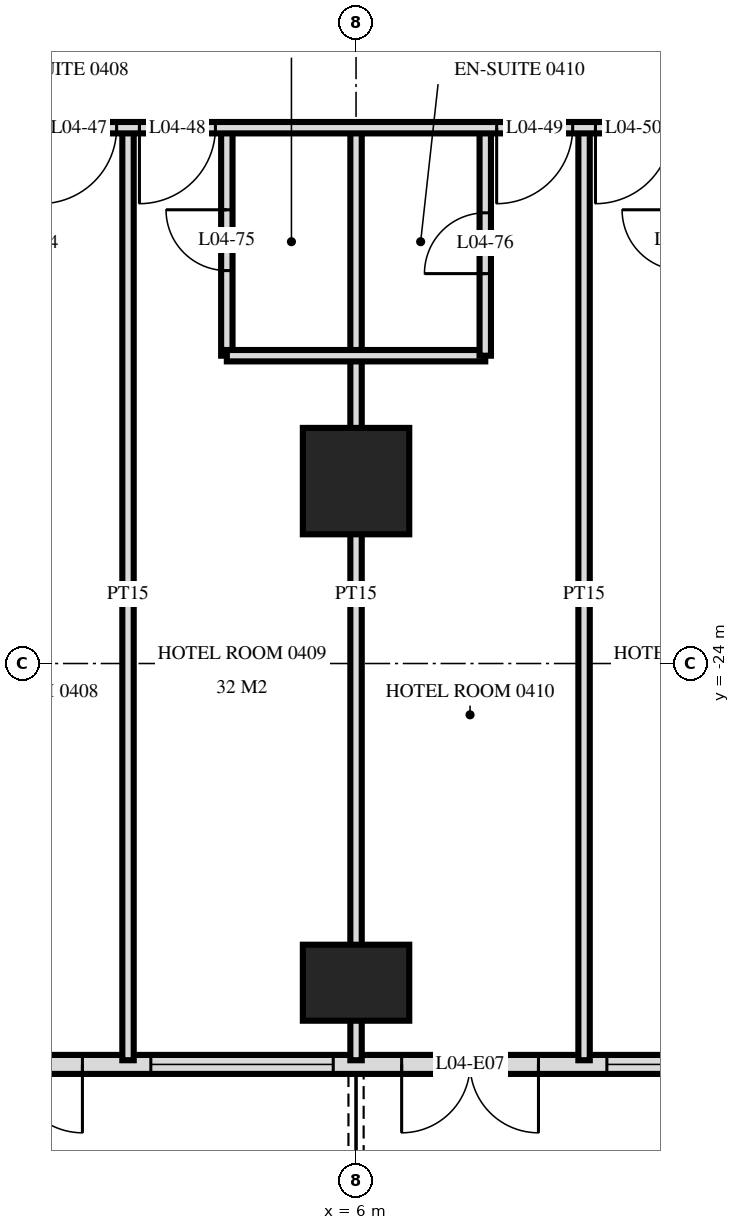
"""IFC4 building model, lengths in metres.
Left out: names, types, materials, properties, quantities, classifications, styles, units other than length and angle.
Written with IfcOpenShell. Run it as: python <this file> out.ifc"""

import sys

from ifc_helpers import new_model, si_unit, direction, frame, frame_2d, origin, origin_2d, place, context, subcontext, project, spatial, rectangle, extrude, element, fill, save


model = new_model("IFC4")
c1 = context("Model", 3, precision=1e-05, world=origin(), true_north=direction((0.0, 1.0)))
c2 = subcontext(c1, "Body", "Model", "MODEL_VIEW")
j1 = project(units=[si_unit("LENGTHUNIT", "METRE"), si_unit("PLANEANGLEUNIT", "RADIAN")], contexts=[c1])
p1 = place(None, origin())
s1 = spatial("IfcSite", under=j1, at=p1, CompositionType="ELEMENT")
p2 = place(p1, origin())
s2 = spatial("IfcBuilding", under=s1, at=p2, CompositionType="ELEMENT")
p3 = place(p2, frame((0.0, 0.0, 24.0)))
s3 = spatial("IfcBuildingStorey", under=s2, at=p3, CompositionType="ELEMENT", Elevation=24.0)
p4 = place(p3, frame((6.0, -28.2, -0.28), z_axis=(0.0, 0.0, 1.0), x_axis=(1.0, 0.0, 0.0)))
e1 = element("IfcColumn", 1, at=p4, inside=s3, PredefinedType="COLUMN", context=c2, shape_type="SweptSolid", body=[
    extrude(rectangle(XDim=1.4, YDim=1.0, at=origin_2d()), origin(), (0.0, 0.0, 1.0), 3.88),
])
p5 = place(p3, frame((6.0, -21.6, -0.28), z_axis=(0.0, 0.0, 1.0), x_axis=(1.0, 0.0, 0.0)))
e2 = element("IfcColumn", 2, at=p5, inside=s3, PredefinedType="COLUMN", context=c2, shape_type="SweptSolid", body=[
    extrude(rectangle(XDim=1.4, YDim=1.4, at=origin_2d()), origin(), (0.0, 0.0, 1.0), 3.88),
])
p6 = place(p3, frame((-28.775, -29.275, 0.0), z_axis=(0.0, 0.0, 1.0), x_axis=(1.0, 0.0, 0.0)))
e3 = element("IfcWall", 3, at=p6, inside=s3, PredefinedType="SOLIDWALL", context=c2, shape_type="SweptSolid", body=[
    extrude(rectangle(XDim=57.551, YDim=0.25, at=frame_2d((28.775, 0.0))), origin(), (0.0, 0.0, 1.0), 3.32),
])
p7 = place(p6, frame((0.575, 0.0, 0.0)))
e4 = element("IfcOpeningElement", 4, at=p7, cuts=e3, PredefinedType="OPENING", context=c2, shape_type="SweptSolid", body=[
    extrude(rectangle(XDim=1.8, YDim=2.4, at=frame_2d((0.9, 1.2))), frame((0.0, 0.135, 0.0), z_axis=(0.0, -1.0, 0.0), x_axis=(1.0, 0.0, 0.0)), (0.0, 0.0, 1.0), 0.27),
])
p8 = place(p6, frame((5.375, 0.0, 0.0)))
e5 = element("IfcOpeningElement", 5, at=p8, cuts=e3, PredefinedType="OPENING", context=c2, shape_type="SweptSolid", body=[
    extrude(rectangle(XDim=1.8, YDim=2.4, at=frame_2d((0.9, 1.2))), frame((0.0, 0.135, 0.0), z_axis=(0.0, -1.0, 0.0), x_axis=(1.0, 0.0, 0.0)), (0.0, 0.0, 1.0), 0.27),
])
p9 = place(p6, frame((8.075, 0.0, 0.3)))
e6 = element("IfcOpeningElement", 6, at=p9, cuts=e3, PredefinedType="OPENING", context=c2, shape_type="SweptSolid", body=[
    extrude(rectangle(XDim=2.4, YDim=2.1, at=frame_2d((1.2, 1.05))), frame((0.0, 0.135, 0.0), z_axis=(0.0, -1.0, 0.0), x_axis=(1.0, 0.0, 0.0)), (0.0, 0.0, 1.0), 0.27),
])
p10 = place(p6, frame((11.375, 0.0, 0.0)))
e7 = element("IfcOpeningElement", 7, at=p10, cuts=e3, PredefinedType="OPENING", context=c2, shape_type="SweptSolid", body=[
    extrude(rectangle(XDim=1.8, YDim=2.4, at=frame_2d((0.9, 1.2))), frame((0.0, 0.135, 0.0), z_axis=(0.0, -1.0, 0.0), x_axis=(1.0, 0.0, 0.0)), (0.0, 0.0, 1.0), 0.27),
])
p11 = place(p6, frame((14.075, 0.0, 0.3)))
e8 = element("IfcOpeningElement", 8, at=p11, cuts=e3, PredefinedType="OPENING", context=c2, shape_type="SweptSolid", body=[
    extrude(rectangle(XDim=2.4, YDim=2.1, at=frame_2d((1.2, 1.05))), frame((0.0, 0.135, 0.0), z_axis=(0.0, -1.0, 0.0), x_axis=(1.0, 0.0, 0.0)), (0.0, 0.0, 1.0), 0.27),
])
p12 = place(p6, frame((17.375, 0.0, 0.0)))
e9 = element("IfcOpeningElement", 9, at=p12, cuts=e3, PredefinedType="OPENING", context=c2, shape_type="SweptSolid", body=[
    extrude(rectangle(XDim=1.8, YDim=2.4, at=frame_2d((0.9, 1.2))), frame((0.0, 0.135, 0.0), z_axis=(0.0, -1.0, 0.0), x_axis=(1.0, 0.0, 0.0)), (0.0, 0.0, 1.0), 0.27),
])
p13 = place(p6, frame((20.075, 0.0, 0.3)))
e10 = element("IfcOpeningElement", 10, at=p13, cuts=e3, PredefinedType="OPENING", context=c2, shape_type="SweptSolid", body=[
    extrude(rectangle(XDim=2.4, YDim=2.1, at=frame_2d((1.2, 1.05))), frame((0.0, 0.135, 0.0), z_axis=(0.0, -1.0, 0.0), x_axis=(1.0, 0.0, 0.0)), (0.0, 0.0, 1.0), 0.27),
])
p14 = place(p6, frame((23.075, 0.0, 0.3)))
e11 = element("IfcOpeningElement", 11, at=p14, cuts=e3, PredefinedType="OPENING", context=c2, shape_type="SweptSolid", body=[
    extrude(rectangle(XDim=2.4, YDim=2.1, at=frame_2d((1.2, 1.05))), frame((0.0, 0.135, 0.0), z_axis=(0.0, -1.0, 0.0), x_axis=(1.0, 0.0, 0.0)), (0.0, 0.0, 1.0), 0.27),
])
p15 = place(p6, frame((26.375, 0.0, 0.0)))
e12 = element("IfcOpeningElement", 12, at=p15, cuts=e3, PredefinedType="OPENING", context=c2, shape_type="SweptSolid", body=[
    extrude(rectangle(XDim=1.8, YDim=2.4, at=frame_2d((0.9, 1.2))), frame((0.0, 0.135, 0.0), z_axis=(0.0, -1.0, 0.0), x_axis=(1.0, 0.0, 0.0)), (0.0, 0.0, 1.0), 0.27),
])
p16 = place(p6, frame((29.375, 0.0, 0.0)))
e13 = element("IfcOpeningElement", 13, at=p16, cuts=e3, PredefinedType="OPENING", context=c2, shape_type="SweptSolid", body=[
    extrude(rectangle(XDim=1.8, YDim=2.4, at=frame_2d((0.9, 1.2))), frame((0.0, 0.135, 0.0), z_axis=(0.0, -1.0, 0.0), x_axis=(1.0, 0.0, 0.0)), (0.0, 0.0, 1.0), 0.27),
])
p17 = place(p6, frame((32.075, 0.0, 0.3)))
e14 = element("IfcOpeningElement", 14, at=p17, cuts=e3, PredefinedType="OPENING", context=c2, shape_type="SweptSolid", body=[
    extrude(rectangle(XDim=2.4, YDim=2.1, at=frame_2d((1.2, 1.05))), frame((0.0, 0.135, 0.0), z_axis=(0.0, -1.0, 0.0), x_axis=(1.0, 0.0, 0.0)), (0.0, 0.0, 1.0), 0.27),
])
p18 = place(p6, frame((35.375, 0.0, 0.0)))
e15 = element("IfcOpeningElement", 15, at=p18, cuts=e3, PredefinedType="OPENING", context=c2, shape_type="SweptSolid", body=[
    extrude(rectangle(XDim=1.8, YDim=2.4, at=frame_2d((0.9, 1.2))), frame((0.0, 0.135, 0.0), z_axis=(0.0, -1.0, 0.0), x_axis=(1.0, 0.0, 0.0)), (0.0, 0.0, 1.0), 0.27),
])
p19 = place(p6, frame((38.075, 0.0, 0.3)))
e16 = element("IfcOpeningElement", 16, at=p19, cuts=e3, PredefinedType="OPENING", context=c2, shape_type="SweptSolid", body=[
    extrude(rectangle(XDim=2.4, YDim=2.1, at=frame_2d((1.2, 1.05))), frame((0.0, 0.135, 0.0), z_axis=(0.0, -1.0, 0.0), x_axis=(1.0, 0.0, 0.0)), (0.0, 0.0, 1.0), 0.27),
])
p20 = place(p6, frame((41.375, 0.0, 0.0)))
e17 = element("IfcOpeningElement", 17, at=p20, cuts=e3, PredefinedType="OPENING", context=c2, shape_type="SweptSolid", body=[
    extrude(rectangle(XDim=1.8, YDim=2.4, at=frame_2d((0.9, 1.2))), frame((0.0, 0.135, 0.0), z_axis=(0.0, -1.0, 0.0), x_axis=(1.0, 0.0, 0.0)), (0.0, 0.0, 1.0), 0.27),
])
p21 = place(p6, frame((44.075, 0.0, 0.3)))
e18 = element("IfcOpeningElement", 18, at=p21, cuts=e3, PredefinedType="OPENING", context=c2, shape_type="SweptSolid", body=[
    extrude(rectangle(XDim=2.4, YDim=2.1, at=frame_2d((1.2, 1.05))), frame((0.0, 0.135, 0.0), z_axis=(0.0, -1.0, 0.0), x_axis=(1.0, 0.0, 0.0)), (0.0, 0.0, 1.0), 0.27),
])
p22 = place(p6, frame((47.075, 0.0, 0.3)))
e19 = element("IfcOpeningElement", 19, at=p22, cuts=e3, PredefinedType="OPENING", context=c2, shape_type="SweptSolid", body=[
    extrude(rectangle(XDim=2.4, YDim=2.1, at=frame_2d((1.2, 1.05))), frame((0.0, 0.135, 0.0), z_axis=(0.0, -1.0, 0.0), x_axis=(1.0, 0.0, 0.0)), (0.0, 0.0, 1.0), 0.27),
])
p23 = place(p6, frame((50.375, 0.0, 0.0)))
e20 = element("IfcOpeningElement", 20, at=p23, cuts=e3, PredefinedType="OPENING", context=c2, shape_type="SweptSolid", body=[
    extrude(rectangle(XDim=1.8, YDim=2.4, at=frame_2d((0.9, 1.2))), frame((0.0, 0.135, 0.0), z_axis=(0.0, -1.0, 0.0), x_axis=(1.0, 0.0, 0.0)), (0.0, 0.0, 1.0), 0.27),
])
p24 = place(p6, frame((53.375, 0.0, 0.0)))
e21 = element("IfcOpeningElement", 21, at=p24, cuts=e3, PredefinedType="OPENING", context=c2, shape_type="SweptSolid", body=[
    extrude(rectangle(XDim=1.8, YDim=2.4, at=frame_2d((0.9, 1.2))), frame((0.0, 0.135, 0.0), z_axis=(0.0, -1.0, 0.0), x_axis=(1.0, 0.0, 0.0)), (0.0, 0.0, 1.0), 0.27),
])
p25 = place(p3, frame((9.0, -29.22, 0.0), z_axis=(0.0, 0.0, 1.0), x_axis=(0.0, 1.0, 0.0)))
e22 = element("IfcWall", 22, at=p25, inside=s3, PredefinedType="PARTITIONING", context=c2, shape_type="SweptSolid", body=[
    extrude(rectangle(XDim=12.27, YDim=0.15, at=frame_2d((6.135, 0.0))), origin(), (0.0, 0.0, 1.0), 3.32),
])
p26 = place(p3, frame((7.7, -19.95, 0.0), z_axis=(0.0, 0.0, 1.0), x_axis=(0.0, 1.0, 0.0)))
e23 = element("IfcWall", 23, at=p26, inside=s3, PredefinedType="PARTITIONING", context=c2, shape_type="SweptSolid", body=[
    extrude(rectangle(XDim=3.0, YDim=0.15, at=frame_2d((1.5, 0.0))), origin(), (0.0, 0.0, 1.0), 3.32),
])
p27 = place(p26, frame((1.08, 0.0, 0.0)))
e24 = element("IfcOpeningElement", 24, at=p27, cuts=e23, PredefinedType="OPENING", context=c2, shape_type="SweptSolid", body=[
    extrude(rectangle(XDim=0.8, YDim=2.1, at=frame_2d((0.4, 1.05))), frame((0.0, 0.085, 0.0), z_axis=(0.0, -1.0, 0.0), x_axis=(1.0, 0.0, 0.0)), (0.0, 0.0, 1.0), 0.17),
])
p28 = place(p3, frame((6.0, -29.22, 0.0), z_axis=(0.0, 0.0, 1.0), x_axis=(0.0, 1.0, 0.0)))
e25 = element("IfcWall", 25, at=p28, inside=s3, PredefinedType="PARTITIONING", context=c2, shape_type="SweptSolid", body=[
    extrude(rectangle(XDim=12.27, YDim=0.15, at=frame_2d((6.135, 0.0))), origin(), (0.0, 0.0, 1.0), 3.32),
])
p29 = place(p3, frame((4.3, -19.95, 0.0), z_axis=(0.0, 0.0, 1.0), x_axis=(0.0, 1.0, 0.0)))
e26 = element("IfcWall", 26, at=p29, inside=s3, PredefinedType="PARTITIONING", context=c2, shape_type="SweptSolid", body=[
    extrude(rectangle(XDim=3.0, YDim=0.15, at=frame_2d((1.5, 0.0))), origin(), (0.0, 0.0, 1.0), 3.32),
])
p30 = place(p29, frame((1.12, 0.0, 0.0)))
e27 = element("IfcOpeningElement", 27, at=p30, cuts=e26, PredefinedType="OPENING", context=c2, shape_type="SweptSolid", body=[
    extrude(rectangle(XDim=0.8, YDim=2.1, at=frame_2d((0.4, 1.05))), frame((0.0, 0.085, 0.0), z_axis=(0.0, -1.0, 0.0), x_axis=(1.0, 0.0, 0.0)), (0.0, 0.0, 1.0), 0.17),
])
p31 = place(p3, frame((3.0, -29.22, 0.0), z_axis=(0.0, 0.0, 1.0), x_axis=(0.0, 1.0, 0.0)))
e28 = element("IfcWall", 28, at=p31, inside=s3, PredefinedType="PARTITIONING", context=c2, shape_type="SweptSolid", body=[
    extrude(rectangle(XDim=12.27, YDim=0.15, at=frame_2d((6.135, 0.0))), origin(), (0.0, 0.0, 1.0), 3.32),
])
p32 = place(p3, frame((4.3, -19.95, 0.0), z_axis=(0.0, 0.0, 1.0), x_axis=(1.0, 0.0, 0.0)))
e29 = element("IfcWall", 29, at=p32, inside=s3, PredefinedType="PARTITIONING", context=c2, shape_type="SweptSolid", body=[
    extrude(rectangle(XDim=3.4, YDim=0.15, at=frame_2d((1.7, 0.0))), origin(), (0.0, 0.0, 1.0), 3.32),
])
p33 = place(p3, frame((-33.12, -16.95, 0.0), z_axis=(0.0, 0.0, 1.0), x_axis=(1.0, 0.0, 0.0)))
e30 = element("IfcWall", 30, at=p33, inside=s3, PredefinedType="PARTITIONING", context=c2, shape_type="SweptSolid", body=[
    extrude(rectangle(XDim=66.24, YDim=0.15, at=frame_2d((33.12, 0.0))), origin(), (0.0, 0.0, 1.0), 3.32),
])
p34 = place(p33, frame((9.27, 0.0, 0.0)))
e31 = element("IfcOpeningElement", 31, at=p34, cuts=e30, PredefinedType="OPENING", context=c2, shape_type="SweptSolid", body=[
    extrude(rectangle(XDim=1.0, YDim=2.1, at=frame_2d((0.5, 1.05))), frame((0.0, 0.085, 0.0), z_axis=(0.0, -1.0, 0.0), x_axis=(1.0, 0.0, 0.0)), (0.0, 0.0, 1.0), 0.17),
])
p35 = place(p33, frame((13.97, 0.0, 0.0)))
e32 = element("IfcOpeningElement", 32, at=p35, cuts=e30, PredefinedType="OPENING", context=c2, shape_type="SweptSolid", body=[
    extrude(rectangle(XDim=1.0, YDim=2.1, at=frame_2d((0.5, 1.05))), frame((0.0, 0.085, 0.0), z_axis=(0.0, -1.0, 0.0), x_axis=(1.0, 0.0, 0.0)), (0.0, 0.0, 1.0), 0.17),
])
p36 = place(p33, frame((15.27, 0.0, 0.0)))
e33 = element("IfcOpeningElement", 33, at=p36, cuts=e30, PredefinedType="OPENING", context=c2, shape_type="SweptSolid", body=[
    extrude(rectangle(XDim=1.0, YDim=2.1, at=frame_2d((0.5, 1.05))), frame((0.0, 0.085, 0.0), z_axis=(0.0, -1.0, 0.0), x_axis=(1.0, 0.0, 0.0)), (0.0, 0.0, 1.0), 0.17),
])
p37 = place(p33, frame((19.97, 0.0, 0.0)))
e34 = element("IfcOpeningElement", 34, at=p37, cuts=e30, PredefinedType="OPENING", context=c2, shape_type="SweptSolid", body=[
    extrude(rectangle(XDim=1.0, YDim=2.1, at=frame_2d((0.5, 1.05))), frame((0.0, 0.085, 0.0), z_axis=(0.0, -1.0, 0.0), x_axis=(1.0, 0.0, 0.0)), (0.0, 0.0, 1.0), 0.17),
])
p38 = place(p33, frame((22.27, 0.0, 0.0)))
e35 = element("IfcOpeningElement", 35, at=p38, cuts=e30, PredefinedType="OPENING", context=c2, shape_type="SweptSolid", body=[
    extrude(rectangle(XDim=1.0, YDim=2.1, at=frame_2d((0.5, 1.05))), frame((0.0, 0.085, 0.0), z_axis=(0.0, -1.0, 0.0), x_axis=(1.0, 0.0, 0.0)), (0.0, 0.0, 1.0), 0.17),
])
p39 = place(p33, frame((28.97, 0.0, 0.0)))
e36 = element("IfcOpeningElement", 36, at=p39, cuts=e30, PredefinedType="OPENING", context=c2, shape_type="SweptSolid", body=[
    extrude(rectangle(XDim=1.0, YDim=2.1, at=frame_2d((0.5, 1.05))), frame((0.0, 0.085, 0.0), z_axis=(0.0, -1.0, 0.0), x_axis=(1.0, 0.0, 0.0)), (0.0, 0.0, 1.0), 0.17),
])
p40 = place(p33, frame((30.27, 0.0, 0.0)))
e37 = element("IfcOpeningElement", 37, at=p40, cuts=e30, PredefinedType="OPENING", context=c2, shape_type="SweptSolid", body=[
    extrude(rectangle(XDim=1.0, YDim=2.1, at=frame_2d((0.5, 1.05))), frame((0.0, 0.085, 0.0), z_axis=(0.0, -1.0, 0.0), x_axis=(1.0, 0.0, 0.0)), (0.0, 0.0, 1.0), 0.17),
])
p41 = place(p33, frame((34.97, 0.0, 0.0)))
e38 = element("IfcOpeningElement", 38, at=p41, cuts=e30, PredefinedType="OPENING", context=c2, shape_type="SweptSolid", body=[
    extrude(rectangle(XDim=1.0, YDim=2.1, at=frame_2d((0.5, 1.05))), frame((0.0, 0.085, 0.0), z_axis=(0.0, -1.0, 0.0), x_axis=(1.0, 0.0, 0.0)), (0.0, 0.0, 1.0), 0.17),
])
p42 = place(p33, frame((36.27, 0.0, 0.0)))
e39 = element("IfcOpeningElement", 39, at=p42, cuts=e30, PredefinedType="OPENING", context=c2, shape_type="SweptSolid", body=[
    extrude(rectangle(XDim=1.0, YDim=2.1, at=frame_2d((0.5, 1.05))), frame((0.0, 0.085, 0.0), z_axis=(0.0, -1.0, 0.0), x_axis=(1.0, 0.0, 0.0)), (0.0, 0.0, 1.0), 0.17),
])
p43 = place(p33, frame((40.97, 0.0, 0.0)))
e40 = element("IfcOpeningElement", 40, at=p43, cuts=e30, PredefinedType="OPENING", context=c2, shape_type="SweptSolid", body=[
    extrude(rectangle(XDim=1.0, YDim=2.1, at=frame_2d((0.5, 1.05))), frame((0.0, 0.085, 0.0), z_axis=(0.0, -1.0, 0.0), x_axis=(1.0, 0.0, 0.0)), (0.0, 0.0, 1.0), 0.17),
])
p44 = place(p33, frame((42.27, 0.0, 0.0)))
e41 = element("IfcOpeningElement", 41, at=p44, cuts=e30, PredefinedType="OPENING", context=c2, shape_type="SweptSolid", body=[
    extrude(rectangle(XDim=1.0, YDim=2.1, at=frame_2d((0.5, 1.05))), frame((0.0, 0.085, 0.0), z_axis=(0.0, -1.0, 0.0), x_axis=(1.0, 0.0, 0.0)), (0.0, 0.0, 1.0), 0.17),
])
p45 = place(p33, frame((46.97, 0.0, 0.0)))
e42 = element("IfcOpeningElement", 42, at=p45, cuts=e30, PredefinedType="OPENING", context=c2, shape_type="SweptSolid", body=[
    extrude(rectangle(XDim=1.0, YDim=2.1, at=frame_2d((0.5, 1.05))), frame((0.0, 0.085, 0.0), z_axis=(0.0, -1.0, 0.0), x_axis=(1.0, 0.0, 0.0)), (0.0, 0.0, 1.0), 0.17),
])
p46 = place(p33, frame((48.27, 0.0, 0.0)))
e43 = element("IfcOpeningElement", 43, at=p46, cuts=e30, PredefinedType="OPENING", context=c2, shape_type="SweptSolid", body=[
    extrude(rectangle(XDim=1.0, YDim=2.1, at=frame_2d((0.5, 1.05))), frame((0.0, 0.085, 0.0), z_axis=(0.0, -1.0, 0.0), x_axis=(1.0, 0.0, 0.0)), (0.0, 0.0, 1.0), 0.17),
])
p47 = place(p33, frame((52.97, 0.0, 0.0)))
e44 = element("IfcOpeningElement", 44, at=p47, cuts=e30, PredefinedType="OPENING", context=c2, shape_type="SweptSolid", body=[
    extrude(rectangle(XDim=1.0, YDim=2.1, at=frame_2d((0.5, 1.05))), frame((0.0, 0.085, 0.0), z_axis=(0.0, -1.0, 0.0), x_axis=(1.0, 0.0, 0.0)), (0.0, 0.0, 1.0), 0.17),
])
p48 = place(p33, frame((54.27, 0.0, 0.0)))
e45 = element("IfcOpeningElement", 45, at=p48, cuts=e30, PredefinedType="OPENING", context=c2, shape_type="SweptSolid", body=[
    extrude(rectangle(XDim=1.0, YDim=2.1, at=frame_2d((0.5, 1.05))), frame((0.0, 0.085, 0.0), z_axis=(0.0, -1.0, 0.0), x_axis=(1.0, 0.0, 0.0)), (0.0, 0.0, 1.0), 0.17),
])
p49 = place(p33, frame((4.4, 0.0, 0.0)))
e46 = element("IfcOpeningElement", 46, at=p49, cuts=e30, PredefinedType="OPENING", context=c2, shape_type="SweptSolid", body=[
    extrude(rectangle(XDim=1.0, YDim=2.1, at=frame_2d((0.5, 1.05))), frame((0.0, 0.085, 0.0), z_axis=(0.0, -1.0, 0.0), x_axis=(1.0, 0.0, 0.0)), (0.0, 0.0, 1.0), 0.17),
])
p50 = place(p33, frame((60.8, 0.0, 0.0)))
e47 = element("IfcOpeningElement", 47, at=p50, cuts=e30, PredefinedType="OPENING", context=c2, shape_type="SweptSolid", body=[
    extrude(rectangle(XDim=1.0, YDim=2.1, at=frame_2d((0.5, 1.05))), frame((0.0, 0.085, 0.0), z_axis=(0.0, -1.0, 0.0), x_axis=(1.0, 0.0, 0.0)), (0.0, 0.0, 1.0), 0.17),
])
p51 = place(p16, frame((0.9, 0.0, 0.0), z_axis=(0.0, 0.0, 1.0), x_axis=(-1.0, 0.0, 0.0)))
e48 = element("IfcDoor", 48, at=p51, inside=s3, OperationType="DOUBLE_DOOR_SINGLE_SWING", PredefinedType="DOOR", context=c2, shape_type="SweptSolid", body=[
    extrude(rectangle(XDim=1.8, YDim=2.4, at=frame_2d((0.0, 1.2))), frame((0.0, -0.025, 0.0), z_axis=(0.0, 1.0, 0.0), x_axis=(-1.0, 0.0, 0.0)), (0.0, 0.0, 1.0), 0.05),
])
fill(e13, e48)
p52 = place(p17, origin())
e49 = element("IfcWindow", 49, at=p52, inside=s3, PartitioningType="SINGLE_PANEL", PredefinedType="WINDOW", context=c2, shape_type="SweptSolid", body=[
    extrude(rectangle(XDim=2.4, YDim=2.1, at=frame_2d((1.2, 1.05))), frame((0.0, 0.03, 0.0), z_axis=(0.0, -1.0, 0.0), x_axis=(1.0, 0.0, 0.0)), (0.0, 0.0, 1.0), 0.06),
])
fill(e14, e49)
p53 = place(p18, frame((0.9, 0.0, 0.0), z_axis=(0.0, 0.0, 1.0), x_axis=(-1.0, 0.0, 0.0)))
e50 = element("IfcDoor", 50, at=p53, inside=s3, OperationType="DOUBLE_DOOR_SINGLE_SWING", PredefinedType="DOOR", context=c2, shape_type="SweptSolid", body=[
    extrude(rectangle(XDim=1.8, YDim=2.4, at=frame_2d((0.0, 1.2))), frame((0.0, -0.025, 0.0), z_axis=(0.0, 1.0, 0.0), x_axis=(-1.0, 0.0, 0.0)), (0.0, 0.0, 1.0), 0.05),
])
fill(e15, e50)
p54 = place(p19, origin())
e51 = element("IfcWindow", 51, at=p54, inside=s3, PartitioningType="SINGLE_PANEL", PredefinedType="WINDOW", context=c2, shape_type="SweptSolid", body=[
    extrude(rectangle(XDim=2.4, YDim=2.1, at=frame_2d((1.2, 1.05))), frame((0.0, 0.03, 0.0), z_axis=(0.0, -1.0, 0.0), x_axis=(1.0, 0.0, 0.0)), (0.0, 0.0, 1.0), 0.06),
])
fill(e16, e51)
p55 = place(p41, frame((0.5, 0.0, 0.0), z_axis=(0.0, 0.0, 1.0), x_axis=(-1.0, 0.0, 0.0)))
e52 = element("IfcDoor", 52, at=p55, inside=s3, OperationType="SINGLE_SWING_LEFT", PredefinedType="DOOR", context=c2, shape_type="SweptSolid", body=[
    extrude(rectangle(XDim=1.0, YDim=2.1, at=frame_2d((0.0, 1.05))), frame((0.0, -0.025, 0.0), z_axis=(0.0, 1.0, 0.0), x_axis=(-1.0, 0.0, 0.0)), (0.0, 0.0, 1.0), 0.05),
])
fill(e38, e52)
p56 = place(p42, frame((0.5, 0.0, 0.0), z_axis=(0.0, 0.0, 1.0), x_axis=(-1.0, 0.0, 0.0)))
e53 = element("IfcDoor", 53, at=p56, inside=s3, OperationType="SINGLE_SWING_LEFT", PredefinedType="DOOR", context=c2, shape_type="SweptSolid", body=[
    extrude(rectangle(XDim=1.0, YDim=2.1, at=frame_2d((0.0, 1.05))), frame((0.0, -0.025, 0.0), z_axis=(0.0, 1.0, 0.0), x_axis=(-1.0, 0.0, 0.0)), (0.0, 0.0, 1.0), 0.05),
])
fill(e39, e53)
p57 = place(p43, frame((0.5, 0.0, 0.0), z_axis=(0.0, 0.0, 1.0), x_axis=(-1.0, 0.0, 0.0)))
e54 = element("IfcDoor", 54, at=p57, inside=s3, OperationType="SINGLE_SWING_LEFT", PredefinedType="DOOR", context=c2, shape_type="SweptSolid", body=[
    extrude(rectangle(XDim=1.0, YDim=2.1, at=frame_2d((0.0, 1.05))), frame((0.0, -0.025, 0.0), z_axis=(0.0, 1.0, 0.0), x_axis=(-1.0, 0.0, 0.0)), (0.0, 0.0, 1.0), 0.05),
])
fill(e40, e54)
p58 = place(p44, frame((0.5, 0.0, 0.0), z_axis=(0.0, 0.0, 1.0), x_axis=(-1.0, 0.0, 0.0)))
e55 = element("IfcDoor", 55, at=p58, inside=s3, OperationType="SINGLE_SWING_LEFT", PredefinedType="DOOR", context=c2, shape_type="SweptSolid", body=[
    extrude(rectangle(XDim=1.0, YDim=2.1, at=frame_2d((0.0, 1.05))), frame((0.0, -0.025, 0.0), z_axis=(0.0, 1.0, 0.0), x_axis=(-1.0, 0.0, 0.0)), (0.0, 0.0, 1.0), 0.05),
])
fill(e41, e55)
p59 = place(p30, origin())
e56 = element("IfcDoor", 56, at=p59, inside=s3, OperationType="SINGLE_SWING_LEFT", PredefinedType="DOOR", context=c2, shape_type="SweptSolid", body=[
    extrude(rectangle(XDim=0.8, YDim=2.1, at=frame_2d((0.4, 1.05))), frame((0.0, 0.025, 0.0), z_axis=(0.0, -1.0, 0.0), x_axis=(1.0, 0.0, 0.0)), (0.0, 0.0, 1.0), 0.05),
])
fill(e27, e56)
p60 = place(p27, origin())
e57 = element("IfcDoor", 57, at=p60, inside=s3, OperationType="SINGLE_SWING_RIGHT", PredefinedType="DOOR", context=c2, shape_type="SweptSolid", body=[
    extrude(rectangle(XDim=0.8, YDim=2.1, at=frame_2d((0.4, 1.05))), frame((0.0, 0.025, 0.0), z_axis=(0.0, -1.0, 0.0), x_axis=(1.0, 0.0, 0.0)), (0.0, 0.0, 1.0), 0.05),
])
fill(e24, e57)
save(model, sys.argv[1])
